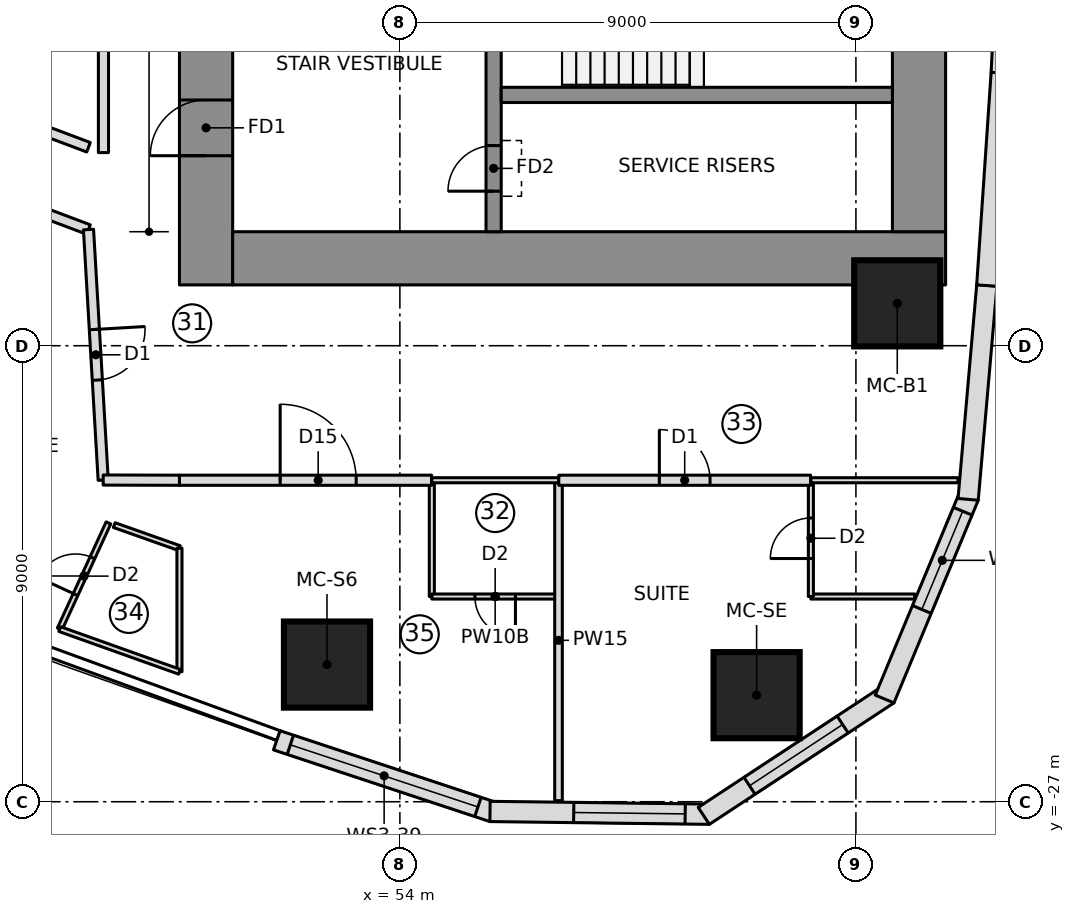
"""IFC4 building model, lengths in metres.
Left out: names, types, materials, properties, quantities, classifications, styles, units other than length and angle.
Written with IfcOpenShell. Run it as: python <this file> out.ifc"""

import sys

from ifc_helpers import new_model, si_unit, direction, frame, frame_2d, origin, origin_2d, place, context, subcontext, project, spatial, polyline, rectangle, outline, extrude, element, fill, save


model = new_model("IFC4")
c1 = context("Model", 3, precision=1e-05, world=origin(), true_north=direction((0.0, 1.0)))
c2 = subcontext(c1, "Body", "Model", "MODEL_VIEW")
j1 = project(units=[si_unit("LENGTHUNIT", "METRE"), si_unit("PLANEANGLEUNIT", "RADIAN")], contexts=[c1])
p1 = place(None, origin())
s1 = spatial("IfcSite", under=j1, at=p1, CompositionType="ELEMENT")
p2 = place(p1, origin())
s2 = spatial("IfcBuilding", under=s1, at=p2, CompositionType="ELEMENT")
p3 = place(p2, frame((0.0, 0.0, 99.1)))
s3 = spatial("IfcBuildingStorey", under=s2, at=p3, CompositionType="ELEMENT", Elevation=99.1)
p4 = place(p3, frame((50.175, -16.8, 0.0), z_axis=(0.0, 0.0, 1.0), x_axis=(0.0, 1.0, 0.0)))
e1 = element("IfcWall", 1, at=p4, inside=s3, PredefinedType="SHEAR", context=c2, shape_type="SweptSolid", body=[
    extrude(rectangle(XDim=10.15, YDim=1.05, at=frame_2d((5.075, 0.0))), origin(), (0.0, 0.0, 1.0), 3.55),
])
p5 = place(p4, frame((2.55, 0.0, 0.0)))
e2 = element("IfcOpeningElement", 2, at=p5, cuts=e1, PredefinedType="OPENING", context=c2, shape_type="SweptSolid", body=[
    extrude(rectangle(XDim=1.1, YDim=2.1, at=frame_2d((0.55, 1.05))), frame((0.0, 0.535, 0.0), z_axis=(0.0, -1.0, 0.0), x_axis=(1.0, 0.0, 0.0)), (0.0, 0.0, 1.0), 1.07),
])
p6 = place(p3, frame((50.7, -16.275, 0.0), z_axis=(0.0, 0.0, 1.0), x_axis=(1.0, 0.0, 0.0)))
e3 = element("IfcWall", 3, at=p6, inside=s3, PredefinedType="SHEAR", context=c2, shape_type="SweptSolid", body=[
    extrude(rectangle(XDim=14.07, YDim=1.05, at=frame_2d((7.035, 0.0))), origin(), (0.0, 0.0, 1.0), 3.55),
])
p7 = place(p3, frame((64.245, -15.75, 0.0), z_axis=(0.0, 0.0, 1.0), x_axis=(0.0, 1.0, 0.0)))
e4 = element("IfcWall", 4, at=p7, inside=s3, PredefinedType="SHEAR", context=c2, shape_type="SweptSolid", body=[
    extrude(rectangle(XDim=6.361, YDim=1.05, at=frame_2d((3.181, 0.0))), origin(), (0.0, 0.0, 1.0), 3.55),
])
p8 = place(p3, frame((55.85, -15.75, 0.0), z_axis=(0.0, 0.0, 1.0), x_axis=(0.0, 1.0, 0.0)))
e5 = element("IfcWall", 5, at=p8, inside=s3, PredefinedType="SHEAR", context=c2, shape_type="SweptSolid", body=[
    extrude(rectangle(XDim=5.4, YDim=0.3, at=frame_2d((2.7, 0.0))), origin(), (0.0, 0.0, 1.0), 3.55),
])
p9 = place(p8, frame((3.6, 0.0, 0.0)))
e6 = element("IfcOpeningElement", 6, at=p9, cuts=e5, PredefinedType="OPENING", context=c2, shape_type="SweptSolid", body=[
    extrude(rectangle(XDim=1.1, YDim=2.1, at=frame_2d((0.55, 1.05))), frame((0.0, 0.16, 0.0), z_axis=(0.0, -1.0, 0.0), x_axis=(1.0, 0.0, 0.0)), (0.0, 0.0, 1.0), 0.32),
])
p10 = place(p8, frame((0.8, 0.0, 0.0)))
e7 = element("IfcOpeningElement", 7, at=p10, cuts=e5, PredefinedType="OPENING", context=c2, shape_type="SweptSolid", body=[
    extrude(rectangle(XDim=0.9, YDim=2.1, at=frame_2d((0.45, 1.05))), frame((0.0, 0.16, 0.0), z_axis=(0.0, -1.0, 0.0), x_axis=(1.0, 0.0, 0.0)), (0.0, 0.0, 1.0), 0.32),
])
p11 = place(p3, frame((56.0, -13.05, 0.0), z_axis=(0.0, 0.0, 1.0), x_axis=(1.0, 0.0, 0.0)))
e8 = element("IfcWall", 8, at=p11, inside=s3, PredefinedType="SHEAR", context=c2, shape_type="SweptSolid", body=[
    extrude(rectangle(XDim=7.72, YDim=0.3, at=frame_2d((3.86, 0.0))), origin(), (0.0, 0.0, 1.0), 3.55),
])
for number, where, z_axis, x_axis in (
    (9, (52.562, -24.293, 0.0), (0.0, 0.0, 1.0), (1.0, 0.0, 0.0)),
    (10, (61.04, -24.897, 0.0), (0.0, 0.0, 1.0), (1.0, 0.0, 0.0)),
    (11, (63.816, -17.164, 0.0), (0.0, 0.0, 1.0), (1.0, 0.0, 0.0)),
):
    element("IfcColumn", number, at=place(p3, frame(where, z_axis=z_axis, x_axis=x_axis)), inside=s3, PredefinedType="COLUMN", context=c2, shape_type="SweptSolid", body=[
        extrude(rectangle(XDim=1.7, YDim=1.7, at=origin_2d()), origin(), (0.0, 0.0, 1.0), 3.55),
    ])
p12 = place(p3, frame((51.569, -25.787, 0.0), z_axis=(0.0, 0.0, 1.0), x_axis=(0.94925004851, -0.314522408429, 0.0)))
e12 = element("IfcWall", 12, at=p12, inside=s3, PredefinedType="NOTDEFINED", context=c2, shape_type="SweptSolid", body=[
    extrude(outline(polyline([(0.0, -0.2), (4.499, -0.2), (4.437, 0.2), (0.0, 0.2), (0.0, -0.2)])), origin(), (0.0, 0.0, 1.0), 3.25),
])
p13 = place(p12, frame((0.284, 0.0, 0.9)))
e13 = element("IfcOpeningElement", 13, at=p13, cuts=e12, PredefinedType="OPENING", context=c2, shape_type="SweptSolid", body=[
    extrude(rectangle(XDim=3.9, YDim=1.8, at=frame_2d((1.95, 0.9))), frame((0.0, 0.21, 0.0), z_axis=(0.0, -1.0, 0.0), x_axis=(1.0, 0.0, 0.0)), (0.0, 0.0, 1.0), 0.42),
])
p14 = place(p3, frame((55.81, -27.192, 0.0), z_axis=(0.0, 0.0, 1.0), x_axis=(0.999919718849, -0.012671063772, 0.0)))
e14 = element("IfcWall", 14, at=p14, inside=s3, PredefinedType="NOTDEFINED", context=c2, shape_type="SweptSolid", body=[
    extrude(outline(polyline([(-0.031, -0.2), (4.3, -0.2), (4.177, 0.2), (0.031, 0.2), (-0.031, -0.2)])), origin(), (0.0, 0.0, 1.0), 3.25),
])
p15 = place(p14, frame((1.621, 0.0, 0.6)))
e15 = element("IfcOpeningElement", 15, at=p15, cuts=e14, PredefinedType="OPENING", context=c2, shape_type="SweptSolid", body=[
    extrude(outline(polyline([(0.0, 1.35), (0.084, 1.771), (0.322, 2.128), (0.679, 2.366), (1.1, 2.45), (1.521, 2.366), (1.878, 2.128), (2.116, 1.771), (2.2, 1.35), (2.2, 1.1), (2.116, 0.679), (1.878, 0.322), (1.521, 0.084), (1.1, 0.0), (0.679, 0.084), (0.322, 0.322), (0.084, 0.679), (0.0, 1.1), (0.0, 1.35)])), frame((0.0, 0.21, 0.0), z_axis=(0.0, -1.0, 0.0), x_axis=(1.0, 0.0, 0.0)), (0.0, 0.0, 1.0), 0.42),
])
p16 = place(p3, frame((60.049, -27.246, 0.0), z_axis=(0.0, 0.0, 1.0), x_axis=(0.835340523653, 0.549732852887, 0.0)))
e16 = element("IfcWall", 16, at=p16, inside=s3, PredefinedType="NOTDEFINED", context=c2, shape_type="SweptSolid", body=[
    extrude(outline(polyline([(-0.061, -0.2), (4.3, -0.2), (4.178, 0.2), (0.061, 0.2), (-0.061, -0.2)])), origin(), (0.0, 0.0, 1.0), 3.25),
])
p17 = place(p16, frame((1.02, 0.0, 0.6)))
e17 = element("IfcOpeningElement", 17, at=p17, cuts=e16, PredefinedType="OPENING", context=c2, shape_type="SweptSolid", body=[
    extrude(outline(polyline([(0.0, 1.35), (0.084, 1.771), (0.322, 2.128), (0.679, 2.366), (1.1, 2.45), (1.521, 2.366), (1.878, 2.128), (2.116, 1.771), (2.2, 1.35), (2.2, 1.1), (2.116, 0.679), (1.878, 0.322), (1.521, 0.084), (1.1, 0.0), (0.679, 0.084), (0.322, 0.322), (0.084, 0.679), (0.0, 1.1), (0.0, 1.35)])), frame((0.0, 0.21, 0.0), z_axis=(0.0, -1.0, 0.0), x_axis=(1.0, 0.0, 0.0)), (0.0, 0.0, 1.0), 0.42),
])
p18 = place(p3, frame((63.59, -24.916, 0.0), z_axis=(0.0, 0.0, 1.0), x_axis=(0.383997751971, 0.923334027577, 0.0)))
e18 = element("IfcWall", 18, at=p18, inside=s3, PredefinedType="NOTDEFINED", context=c2, shape_type="SweptSolid", body=[
    extrude(outline(polyline([(-0.061, -0.2), (4.27, -0.2), (4.208, 0.2), (0.061, 0.2), (-0.061, -0.2)])), origin(), (0.0, 0.0, 1.0), 3.25),
])
p19 = place(p18, frame((1.852, 0.0, 0.6)))
e19 = element("IfcOpeningElement", 19, at=p19, cuts=e18, PredefinedType="OPENING", context=c2, shape_type="SweptSolid", body=[
    extrude(outline(polyline([(0.0, 1.4), (0.08, 1.802), (0.308, 2.142), (0.648, 2.37), (1.05, 2.45), (1.452, 2.37), (1.792, 2.142), (2.02, 1.802), (2.1, 1.4), (2.1, 1.05), (2.02, 0.648), (1.792, 0.308), (1.452, 0.08), (1.05, 0.0), (0.648, 0.08), (0.308, 0.308), (0.08, 0.648), (0.0, 1.05), (0.0, 1.4)])), frame((0.0, 0.21, 0.0), z_axis=(0.0, -1.0, 0.0), x_axis=(1.0, 0.0, 0.0)), (0.0, 0.0, 1.0), 0.42),
])
p20 = place(p3, frame((65.217, -21.002, 0.0), z_axis=(0.0, 0.0, 1.0), x_axis=(0.086992730434, 0.996208946382, 0.0)))
e20 = element("IfcWall", 20, at=p20, inside=s3, PredefinedType="NOTDEFINED", context=c2, shape_type="SweptSolid", body=[
    extrude(outline(polyline([(-0.031, -0.2), (4.209, -0.2), (4.205, 0.2), (0.031, 0.2), (-0.031, -0.2)])), origin(), (0.0, 0.0, 1.0), 3.25),
])
p21 = place(p3, frame((65.583, -16.811, 0.0), z_axis=(0.0, 0.0, 1.0), x_axis=(0.067724559895, 0.997704056315, 0.0)))
e21 = element("IfcWall", 21, at=p21, inside=s3, PredefinedType="NOTDEFINED", context=c2, shape_type="SweptSolid", body=[
    extrude(outline(polyline([(-0.002, -0.2), (4.209, -0.2), (4.205, 0.2), (0.002, 0.2), (-0.002, -0.2)])), origin(), (0.0, 0.0, 1.0), 3.25),
])
p22 = place(p3, frame((65.868, -12.614, 0.0), z_axis=(0.0, 0.0, 1.0), x_axis=(0.048342691508, 0.998830808585, 0.0)))
e22 = element("IfcWall", 22, at=p22, inside=s3, PredefinedType="NOTDEFINED", context=c2, shape_type="SweptSolid", body=[
    extrude(outline(polyline([(-0.002, -0.2), (4.209, -0.2), (4.205, 0.2), (0.002, 0.2), (-0.002, -0.2)])), origin(), (0.0, 0.0, 1.0), 3.25),
])
p23 = place(p3, frame((54.631, -22.95, 0.0), z_axis=(0.0, 0.0, 1.0), x_axis=(0.0, 1.0, 0.0)))
e23 = element("IfcWall", 23, at=p23, inside=s3, PredefinedType="PARTITIONING", context=c2, shape_type="SweptSolid", body=[
    extrude(rectangle(XDim=2.3, YDim=0.1, at=frame_2d((1.15, 0.0))), origin(), (0.0, 0.0, 1.0), 3.25),
])
p24 = place(p3, frame((57.131, -22.95, 0.0), z_axis=(0.0, 0.0, 1.0), x_axis=(-1.0, 0.0, 0.0)))
e24 = element("IfcWall", 24, at=p24, inside=s3, PredefinedType="PARTITIONING", context=c2, shape_type="SweptSolid", body=[
    extrude(rectangle(XDim=2.5, YDim=0.1, at=frame_2d((1.25, 0.0))), origin(), (0.0, 0.0, 1.0), 3.25),
])
p25 = place(p24, frame((0.85, 0.0, 0.0)))
e25 = element("IfcOpeningElement", 25, at=p25, cuts=e24, PredefinedType="OPENING", context=c2, shape_type="SweptSolid", body=[
    extrude(rectangle(XDim=0.8, YDim=2.1, at=frame_2d((0.4, 1.05))), frame((0.0, 0.06, 0.0), z_axis=(0.0, -1.0, 0.0), x_axis=(1.0, 0.0, 0.0)), (0.0, 0.0, 1.0), 0.12),
])
p26 = place(p3, frame((64.16, -22.95, 0.0), z_axis=(0.0, 0.0, 1.0), x_axis=(-1.0, 0.0, 0.0)))
e26 = element("IfcWall", 26, at=p26, inside=s3, PredefinedType="PARTITIONING", context=c2, shape_type="SweptSolid", body=[
    extrude(rectangle(XDim=2.049, YDim=0.1, at=frame_2d((1.025, 0.0))), origin(), (0.0, 0.0, 1.0), 3.25),
])
p27 = place(p3, frame((62.111, -22.95, 0.0), z_axis=(0.0, 0.0, 1.0), x_axis=(0.0, 1.0, 0.0)))
e27 = element("IfcWall", 27, at=p27, inside=s3, PredefinedType="PARTITIONING", context=c2, shape_type="SweptSolid", body=[
    extrude(rectangle(XDim=2.3, YDim=0.1, at=frame_2d((1.15, 0.0))), origin(), (0.0, 0.0, 1.0), 3.25),
])
p28 = place(p27, frame((0.75, 0.0, 0.0)))
e28 = element("IfcOpeningElement", 28, at=p28, cuts=e27, PredefinedType="OPENING", context=c2, shape_type="SweptSolid", body=[
    extrude(rectangle(XDim=0.8, YDim=2.1, at=frame_2d((0.4, 1.05))), frame((0.0, 0.06, 0.0), z_axis=(0.0, -1.0, 0.0), x_axis=(1.0, 0.0, 0.0)), (0.0, 0.0, 1.0), 0.12),
])
p29 = place(p3, frame((57.131, -26.979, 0.0), z_axis=(0.0, 0.0, 1.0), x_axis=(0.0, 1.0, 0.0)))
e29 = element("IfcWall", 29, at=p29, inside=s3, PredefinedType="PARTITIONING", context=c2, shape_type="SweptSolid", body=[
    extrude(rectangle(XDim=6.329, YDim=0.15, at=frame_2d((3.165, 0.0))), origin(), (0.0, 0.0, 1.0), 3.25),
])
p30 = place(p3, frame((48.363, -21.54, 0.0), z_axis=(0.0, 0.0, 1.0), x_axis=(0.942692856107, -0.333661773425, 0.0)))
e30 = element("IfcWall", 30, at=p30, inside=s3, PredefinedType="PARTITIONING", context=c2, shape_type="SweptSolid", body=[
    extrude(rectangle(XDim=1.365, YDim=0.1, at=frame_2d((0.683, 0.0))), origin(), (0.0, 0.0, 1.0), 3.25),
])
p31 = place(p3, frame((47.286, -23.592, 0.0), z_axis=(0.0, 0.0, 1.0), x_axis=(0.41749308293, 0.908680100864, 0.0)))
e31 = element("IfcWall", 31, at=p31, inside=s3, PredefinedType="PARTITIONING", context=c2, shape_type="SweptSolid", body=[
    extrude(rectangle(XDim=2.306, YDim=0.1, at=frame_2d((1.153, 0.0))), origin(), (0.0, 0.0, 1.0), 3.25),
])
p32 = place(p31, frame((0.75, 0.0, 0.0)))
e32 = element("IfcOpeningElement", 32, at=p32, cuts=e31, PredefinedType="OPENING", context=c2, shape_type="SweptSolid", body=[
    extrude(rectangle(XDim=0.8, YDim=2.1, at=frame_2d((0.4, 1.05))), frame((0.0, 0.06, 0.0), z_axis=(0.0, -1.0, 0.0), x_axis=(1.0, 0.0, 0.0)), (0.0, 0.0, 1.0), 0.12),
])
p33 = place(p3, frame((49.65, -20.655, 0.0), z_axis=(0.0, 0.0, 1.0), x_axis=(1.0, 0.0, 0.0)))
e33 = element("IfcWall", 33, at=p33, inside=s3, PredefinedType="PARTITIONING", context=c2, shape_type="SweptSolid", body=[
    extrude(rectangle(XDim=4.976, YDim=0.2, at=frame_2d((2.488, 0.0))), origin(), (0.0, 0.0, 1.0), 3.25),
])
p34 = place(p33, frame((1.988, 0.0, 0.0)))
e34 = element("IfcOpeningElement", 34, at=p34, cuts=e33, PredefinedType="OPENING", context=c2, shape_type="SweptSolid", body=[
    extrude(rectangle(XDim=1.5, YDim=2.1, at=frame_2d((0.75, 1.05))), frame((0.0, 0.11, 0.0), z_axis=(0.0, -1.0, 0.0), x_axis=(1.0, 0.0, 0.0)), (0.0, 0.0, 1.0), 0.22),
])
p35 = place(p3, frame((57.135, -20.655, 0.0), z_axis=(0.0, 0.0, 1.0), x_axis=(1.0, 0.0, 0.0)))
e35 = element("IfcWall", 35, at=p35, inside=s3, PredefinedType="PARTITIONING", context=c2, shape_type="SweptSolid", body=[
    extrude(rectangle(XDim=4.971, YDim=0.2, at=frame_2d((2.485, 0.0))), origin(), (0.0, 0.0, 1.0), 3.25),
])
p36 = place(p35, frame((1.985, 0.0, 0.0)))
e36 = element("IfcOpeningElement", 36, at=p36, cuts=e35, PredefinedType="OPENING", context=c2, shape_type="SweptSolid", body=[
    extrude(rectangle(XDim=1.0, YDim=2.1, at=frame_2d((0.5, 1.05))), frame((0.0, 0.11, 0.0), z_axis=(0.0, -1.0, 0.0), x_axis=(1.0, 0.0, 0.0)), (0.0, 0.0, 1.0), 0.22),
])
p37 = place(p3, frame((54.631, -20.655, 0.0), z_axis=(0.0, 0.0, 1.0), x_axis=(1.0, 0.0, 0.0)))
e37 = element("IfcWall", 37, at=p37, inside=s3, PredefinedType="PARTITIONING", context=c2, shape_type="SweptSolid", body=[
    extrude(rectangle(XDim=2.5, YDim=0.1, at=frame_2d((1.25, 0.0))), origin(), (0.0, 0.0, 1.0), 3.25),
])
p38 = place(p3, frame((62.111, -20.655, 0.0), z_axis=(0.0, 0.0, 1.0), x_axis=(1.0, 0.0, 0.0)))
e38 = element("IfcWall", 38, at=p38, inside=s3, PredefinedType="PARTITIONING", context=c2, shape_type="SweptSolid", body=[
    extrude(rectangle(XDim=2.906, YDim=0.1, at=frame_2d((1.453, 0.0))), origin(), (0.0, 0.0, 1.0), 3.25),
])
p39 = place(p3, frame((49.65, -21.996, 0.0), z_axis=(0.0, 0.0, 1.0), x_axis=(0.0, -1.0, 0.0)))
e39 = element("IfcWall", 39, at=p39, inside=s3, PredefinedType="PARTITIONING", context=c2, shape_type="SweptSolid", body=[
    extrude(rectangle(XDim=2.439, YDim=0.1, at=frame_2d((1.22, 0.0))), origin(), (0.0, 0.0, 1.0), 3.25),
])
p40 = place(p3, frame((49.65, -24.435, 0.0), z_axis=(0.0, 0.0, 1.0), x_axis=(-0.941933231826, 0.335800218555, 0.0)))
e40 = element("IfcWall", 40, at=p40, inside=s3, PredefinedType="PARTITIONING", context=c2, shape_type="SweptSolid", body=[
    extrude(rectangle(XDim=2.51, YDim=0.1, at=frame_2d((1.255, 0.0))), origin(), (0.0, 0.0, 1.0), 3.25),
])
p41 = place(p3, frame((46.924, -15.357, 0.0), z_axis=(0.0, 0.0, 1.0), x_axis=(0.935803526171, -0.35252199989, 0.0)))
e41 = element("IfcWall", 41, at=p41, inside=s3, PredefinedType="PARTITIONING", context=c2, shape_type="SweptSolid", body=[
    extrude(rectangle(XDim=0.995, YDim=0.2, at=frame_2d((0.497, 0.0))), origin(), (0.0, 0.0, 1.0), 3.25),
])
p42 = place(p3, frame((47.855, -14.083, 0.0), z_axis=(0.0, 0.0, 1.0), x_axis=(-0.935907269358, 0.352246480696, 0.0)))
e42 = element("IfcWall", 42, at=p42, inside=s3, PredefinedType="PARTITIONING", context=c2, shape_type="SweptSolid", body=[
    extrude(rectangle(XDim=1.239, YDim=0.2, at=frame_2d((0.619, 0.0))), origin(), (0.0, 0.0, 1.0), 3.25),
])
p43 = place(p3, frame((47.855, -15.707, 0.0), z_axis=(0.0, 0.0, 1.0), x_axis=(0.058568850083, -0.998283371493, 0.0)))
e43 = element("IfcWall", 43, at=p43, inside=s3, PredefinedType="PARTITIONING", context=c2, shape_type="SweptSolid", body=[
    extrude(rectangle(XDim=4.952, YDim=0.2, at=frame_2d((2.476, 0.0))), origin(), (0.0, 0.0, 1.0), 3.25),
])
p44 = place(p43, frame((1.976, 0.0, 0.0)))
e44 = element("IfcOpeningElement", 44, at=p44, cuts=e43, PredefinedType="OPENING", context=c2, shape_type="SweptSolid", body=[
    extrude(rectangle(XDim=1.0, YDim=2.1, at=frame_2d((0.5, 1.05))), frame((0.0, 0.11, 0.0), z_axis=(0.0, -1.0, 0.0), x_axis=(1.0, 0.0, 0.0)), (0.0, 0.0, 1.0), 0.22),
])
p45 = place(p3, frame((48.15, 14.189, 0.0), z_axis=(0.0, 0.0, 1.0), x_axis=(0.0, -1.0, 0.0)))
e45 = element("IfcWall", 45, at=p45, inside=s3, PredefinedType="PARTITIONING", context=c2, shape_type="SweptSolid", body=[
    extrude(rectangle(XDim=28.377, YDim=0.2, at=frame_2d((14.189, 0.0))), origin(), (0.0, 0.0, 1.0), 3.25),
])
p46 = place(p3, frame((48.145, -20.651, 0.0), z_axis=(0.0, 0.0, 1.0), x_axis=(0.999996196879, -0.002757938895, 0.0)))
e46 = element("IfcWall", 46, at=p46, inside=s3, PredefinedType="PARTITIONING", context=c2, shape_type="SweptSolid", body=[
    extrude(rectangle(XDim=1.505, YDim=0.2, at=frame_2d((0.752, 0.0))), origin(), (0.0, 0.0, 1.0), 3.25),
])
p47 = place(p13, origin())
e47 = element("IfcWindow", 47, at=p47, inside=s3, PartitioningType="SINGLE_PANEL", PredefinedType="WINDOW", context=c2, shape_type="SweptSolid", body=[
    extrude(rectangle(XDim=3.9, YDim=1.8, at=frame_2d((1.95, 0.9))), frame((0.0, 0.17, 0.0), z_axis=(0.0, -1.0, 0.0), x_axis=(1.0, 0.0, 0.0)), (0.0, 0.0, 1.0), 0.06),
])
fill(e13, e47)
p48 = place(p15, origin())
e48 = element("IfcWindow", 48, at=p48, inside=s3, PartitioningType="SINGLE_PANEL", PredefinedType="WINDOW", context=c2, shape_type="SweptSolid", body=[
    extrude(outline(polyline([(0.0, 1.35), (0.084, 1.771), (0.322, 2.128), (0.679, 2.366), (1.1, 2.45), (1.521, 2.366), (1.878, 2.128), (2.116, 1.771), (2.2, 1.35), (2.2, 1.1), (2.116, 0.679), (1.878, 0.322), (1.521, 0.084), (1.1, 0.0), (0.679, 0.084), (0.322, 0.322), (0.084, 0.679), (0.0, 1.1), (0.0, 1.35)])), frame((0.0, 0.17, 0.0), z_axis=(0.0, -1.0, 0.0), x_axis=(1.0, 0.0, 0.0)), (0.0, 0.0, 1.0), 0.06),
])
fill(e15, e48)
p49 = place(p17, origin())
e49 = element("IfcWindow", 49, at=p49, inside=s3, PartitioningType="SINGLE_PANEL", PredefinedType="WINDOW", context=c2, shape_type="SweptSolid", body=[
    extrude(outline(polyline([(0.0, 1.35), (0.084, 1.771), (0.322, 2.128), (0.679, 2.366), (1.1, 2.45), (1.521, 2.366), (1.878, 2.128), (2.116, 1.771), (2.2, 1.35), (2.2, 1.1), (2.116, 0.679), (1.878, 0.322), (1.521, 0.084), (1.1, 0.0), (0.679, 0.084), (0.322, 0.322), (0.084, 0.679), (0.0, 1.1), (0.0, 1.35)])), frame((0.0, 0.17, 0.0), z_axis=(0.0, -1.0, 0.0), x_axis=(1.0, 0.0, 0.0)), (0.0, 0.0, 1.0), 0.06),
])
fill(e17, e49)
p50 = place(p19, origin())
e50 = element("IfcWindow", 50, at=p50, inside=s3, PartitioningType="SINGLE_PANEL", PredefinedType="WINDOW", context=c2, shape_type="SweptSolid", body=[
    extrude(outline(polyline([(0.0, 1.4), (0.08, 1.802), (0.308, 2.142), (0.648, 2.37), (1.05, 2.45), (1.452, 2.37), (1.792, 2.142), (2.02, 1.802), (2.1, 1.4), (2.1, 1.05), (2.02, 0.648), (1.792, 0.308), (1.452, 0.08), (1.05, 0.0), (0.648, 0.08), (0.308, 0.308), (0.08, 0.648), (0.0, 1.05), (0.0, 1.4)])), frame((0.0, 0.17, 0.0), z_axis=(0.0, -1.0, 0.0), x_axis=(1.0, 0.0, 0.0)), (0.0, 0.0, 1.0), 0.06),
])
fill(e19, e50)
p51 = place(p25, origin())
e51 = element("IfcDoor", 51, at=p51, inside=s3, OperationType="SINGLE_SWING_LEFT", PredefinedType="DOOR", context=c2, shape_type="SweptSolid", body=[
    extrude(rectangle(XDim=0.8, YDim=2.1, at=frame_2d((0.4, 1.05))), frame((0.0, 0.025, 0.0), z_axis=(0.0, -1.0, 0.0), x_axis=(1.0, 0.0, 0.0)), (0.0, 0.0, 1.0), 0.05),
])
fill(e25, e51)
p52 = place(p28, origin())
e52 = element("IfcDoor", 52, at=p52, inside=s3, OperationType="SINGLE_SWING_LEFT", PredefinedType="DOOR", context=c2, shape_type="SweptSolid", body=[
    extrude(rectangle(XDim=0.8, YDim=2.1, at=frame_2d((0.4, 1.05))), frame((0.0, 0.025, 0.0), z_axis=(0.0, -1.0, 0.0), x_axis=(1.0, 0.0, 0.0)), (0.0, 0.0, 1.0), 0.05),
])
fill(e28, e52)
p53 = place(p32, origin())
e53 = element("IfcDoor", 53, at=p53, inside=s3, OperationType="SINGLE_SWING_LEFT", PredefinedType="DOOR", context=c2, shape_type="SweptSolid", body=[
    extrude(rectangle(XDim=0.8, YDim=2.1, at=frame_2d((0.4, 1.05))), frame((0.0, 0.025, 0.0), z_axis=(0.0, -1.0, 0.0), x_axis=(1.0, 0.0, 0.0)), (0.0, 0.0, 1.0), 0.05),
])
fill(e32, e53)
p54 = place(p34, origin())
e54 = element("IfcDoor", 54, at=p54, inside=s3, OperationType="DOUBLE_DOOR_SINGLE_SWING", PredefinedType="DOOR", context=c2, shape_type="SweptSolid", body=[
    extrude(rectangle(XDim=1.5, YDim=2.1, at=frame_2d((0.75, 1.05))), frame((0.0, 0.025, 0.0), z_axis=(0.0, -1.0, 0.0), x_axis=(1.0, 0.0, 0.0)), (0.0, 0.0, 1.0), 0.05),
])
fill(e34, e54)
p55 = place(p36, origin())
e55 = element("IfcDoor", 55, at=p55, inside=s3, OperationType="SINGLE_SWING_LEFT", PredefinedType="DOOR", context=c2, shape_type="SweptSolid", body=[
    extrude(rectangle(XDim=1.0, YDim=2.1, at=frame_2d((0.5, 1.05))), frame((0.0, 0.025, 0.0), z_axis=(0.0, -1.0, 0.0), x_axis=(1.0, 0.0, 0.0)), (0.0, 0.0, 1.0), 0.05),
])
fill(e36, e55)
p56 = place(p44, origin())
e56 = element("IfcDoor", 56, at=p56, inside=s3, OperationType="SINGLE_SWING_LEFT", PredefinedType="DOOR", context=c2, shape_type="SweptSolid", body=[
    extrude(rectangle(XDim=1.0, YDim=2.1, at=frame_2d((0.5, 1.05))), frame((0.0, 0.025, 0.0), z_axis=(0.0, -1.0, 0.0), x_axis=(1.0, 0.0, 0.0)), (0.0, 0.0, 1.0), 0.05),
])
fill(e44, e56)
p57 = place(p5, origin())
e57 = element("IfcDoor", 57, at=p57, inside=s3, OperationType="SINGLE_SWING_RIGHT", PredefinedType="DOOR", context=c2, shape_type="SweptSolid", body=[
    extrude(rectangle(XDim=1.1, YDim=2.1, at=frame_2d((0.55, 1.05))), frame((0.0, 0.025, 0.0), z_axis=(0.0, -1.0, 0.0), x_axis=(1.0, 0.0, 0.0)), (0.0, 0.0, 1.0), 0.05),
])
fill(e2, e57)
p58 = place(p10, origin())
e58 = element("IfcDoor", 58, at=p58, inside=s3, OperationType="SINGLE_SWING_LEFT", PredefinedType="DOOR", context=c2, shape_type="SweptSolid", body=[
    extrude(rectangle(XDim=0.9, YDim=2.1, at=frame_2d((0.45, 1.05))), frame((0.0, 0.025, 0.0), z_axis=(0.0, -1.0, 0.0), x_axis=(1.0, 0.0, 0.0)), (0.0, 0.0, 1.0), 0.05),
])
fill(e7, e58)
save(model, sys.argv[1])
